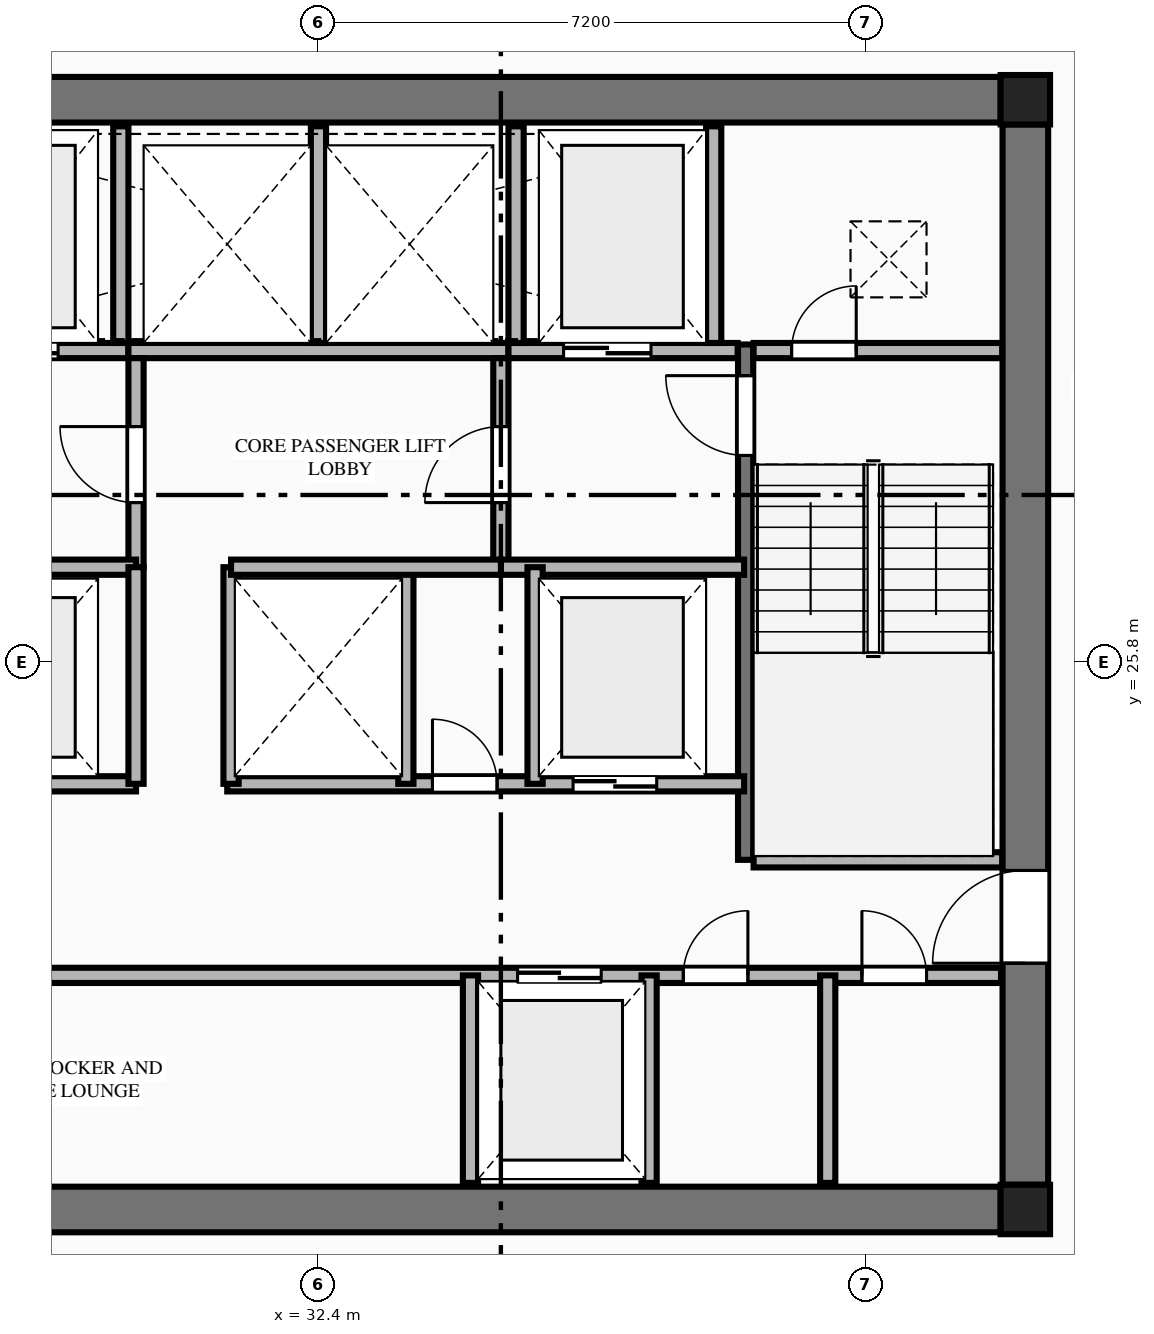
"""IFC4 building model, lengths in metres.
Left out: names, types, materials, properties, quantities, classifications, styles, units other than length and angle.
Written with IfcOpenShell. Run it as: python <this file> out.ifc"""

import sys

from ifc_helpers import new_model, si_unit, direction, frame, frame_2d, origin, origin_2d, place, context, subcontext, project, spatial, rectangle, extrude, element, fill, save


model = new_model("IFC4")
c1 = context("Model", 3, precision=1e-05, world=origin(), true_north=direction((0.0, 1.0)))
c2 = subcontext(c1, "Body", "Model", "MODEL_VIEW")
j1 = project(units=[si_unit("LENGTHUNIT", "METRE"), si_unit("PLANEANGLEUNIT", "RADIAN")], contexts=[c1])
p1 = place(None, origin())
s1 = spatial("IfcSite", under=j1, at=p1, CompositionType="ELEMENT")
p2 = place(p1, origin())
s2 = spatial("IfcBuilding", under=s1, at=p2, CompositionType="ELEMENT")
p3 = place(p2, frame((0.0, 0.0, 157.05)))
s3 = spatial("IfcBuildingStorey", under=s2, at=p3, CompositionType="ELEMENT", Elevation=157.05)
for number, where, z_axis, x_axis in (
    (1, (41.7, 18.6, 0.0), (0.0, 0.0, 1.0), (1.0, 0.0, 0.0)),
    (2, (41.7, 33.2, 0.0), (0.0, 0.0, 1.0), (1.0, 0.0, 0.0)),
):
    element("IfcColumn", number, at=place(p3, frame(where, z_axis=z_axis, x_axis=x_axis)), inside=s3, PredefinedType="COLUMN", context=c2, shape_type="SweptSolid", body=[
        extrude(rectangle(XDim=0.65, YDim=0.65, at=origin_2d()), origin(), (0.0, 0.0, 1.0), 3.55),
    ])
for number, where, z_axis, x_axis in (
    (3, (23.425, 18.6, 0.0), (0.0, 0.0, 1.0), (1.0, 0.0, 0.0)),
    (4, (23.425, 33.2, 0.0), (0.0, 0.0, 1.0), (1.0, 0.0, 0.0)),
):
    element("IfcWall", number, at=place(p3, frame(where, z_axis=z_axis, x_axis=x_axis)), inside=s3, PredefinedType="SHEAR", context=c2, shape_type="SweptSolid", body=[
        extrude(rectangle(XDim=17.95, YDim=0.6, at=frame_2d((8.975, 0.0))), origin(), (0.0, 0.0, 1.0), 3.34),
    ])
p4 = place(p3, frame((41.7, 18.925, 0.0), z_axis=(0.0, 0.0, 1.0), x_axis=(0.0, 1.0, 0.0)))
e5 = element("IfcWall", 5, at=p4, inside=s3, PredefinedType="SHEAR", context=c2, shape_type="SweptSolid", body=[
    extrude(rectangle(XDim=13.95, YDim=0.6, at=frame_2d((6.975, 0.0))), origin(), (0.0, 0.0, 1.0), 3.34),
])
p5 = place(p4, frame((2.915, 0.0, 0.0)))
e6 = element("IfcOpeningElement", 6, at=p5, cuts=e5, PredefinedType="OPENING", context=c2, shape_type="SweptSolid", body=[
    extrude(rectangle(XDim=1.22, YDim=2.25, at=frame_2d((0.61, 1.125))), frame((0.0, 0.31, 0.0), z_axis=(0.0, -1.0, 0.0), x_axis=(1.0, 0.0, 0.0)), (0.0, 0.0, 1.0), 0.62),
])
p6 = place(p3, frame((38.02, 23.2, 0.0), z_axis=(0.0, 0.0, 1.0), x_axis=(0.0, 1.0, 0.0)))
e7 = element("IfcWall", 7, at=p6, inside=s3, PredefinedType="SHEAR", context=c2, shape_type="SweptSolid", body=[
    extrude(rectangle(XDim=6.78, YDim=0.2, at=frame_2d((3.39, 0.0))), origin(), (0.0, 0.0, 1.0), 3.55),
])
p7 = place(p6, frame((5.32, 0.0, 0.0)))
e8 = element("IfcOpeningElement", 8, at=p7, cuts=e7, PredefinedType="OPENING", context=c2, shape_type="SweptSolid", body=[
    extrude(rectangle(XDim=1.05, YDim=2.15, at=frame_2d((0.525, 1.075))), frame((0.0, 0.11, 0.0), z_axis=(0.0, -1.0, 0.0), x_axis=(1.0, 0.0, 0.0)), (0.0, 0.0, 1.0), 0.22),
])
p8 = place(p3, frame((38.125, 23.2, 0.0), z_axis=(0.0, 0.0, 1.0), x_axis=(1.0, 0.0, 0.0)))
e9 = element("IfcWall", 9, at=p8, inside=s3, PredefinedType="PLUMBINGWALL", context=c2, shape_type="SweptSolid", body=[
    extrude(rectangle(XDim=3.27, YDim=0.2, at=frame_2d((1.635, 0.0))), origin(), (0.0, 0.0, 1.0), 3.34),
])
p9 = place(p3, frame((26.885, 29.9, 0.0), z_axis=(0.0, 0.0, 1.0), x_axis=(1.0, 0.0, 0.0)))
e10 = element("IfcWall", 10, at=p9, inside=s3, PredefinedType="PLUMBINGWALL", context=c2, shape_type="SweptSolid", body=[
    extrude(rectangle(XDim=3.015, YDim=0.2, at=frame_2d((1.507, 0.0))), origin(), (0.0, 0.0, 1.0), 3.34),
])
p10 = place(p9, frame((0.94, 0.0, 0.0)))
e11 = element("IfcOpeningElement", 11, at=p10, cuts=e10, PredefinedType="OPENING", context=c2, shape_type="SweptSolid", body=[
    extrude(rectangle(XDim=1.15, YDim=2.2, at=frame_2d((0.575, 1.1))), frame((0.0, 0.11, 0.0), z_axis=(0.0, -1.0, 0.0), x_axis=(1.0, 0.0, 0.0)), (0.0, 0.0, 1.0), 0.22),
])
p11 = place(p3, frame((29.9, 29.9, 0.0), z_axis=(0.0, 0.0, 1.0), x_axis=(1.0, 0.0, 0.0)))
e12 = element("IfcWall", 12, at=p11, inside=s3, PredefinedType="PLUMBINGWALL", context=c2, shape_type="SweptSolid", body=[
    extrude(rectangle(XDim=5.0, YDim=0.2, at=frame_2d((2.5, 0.0))), origin(), (0.0, 0.0, 1.0), 3.34),
])
p12 = place(p3, frame((34.9, 29.9, 0.0), z_axis=(0.0, 0.0, 1.0), x_axis=(1.0, 0.0, 0.0)))
e13 = element("IfcWall", 13, at=p12, inside=s3, PredefinedType="PLUMBINGWALL", context=c2, shape_type="SweptSolid", body=[
    extrude(rectangle(XDim=3.015, YDim=0.2, at=frame_2d((1.508, 0.0))), origin(), (0.0, 0.0, 1.0), 3.34),
])
p13 = place(p12, frame((0.725, 0.0, 0.0)))
e14 = element("IfcOpeningElement", 14, at=p13, cuts=e13, PredefinedType="OPENING", context=c2, shape_type="SweptSolid", body=[
    extrude(rectangle(XDim=1.15, YDim=2.2, at=frame_2d((0.575, 1.1))), frame((0.0, 0.11, 0.0), z_axis=(0.0, -1.0, 0.0), x_axis=(1.0, 0.0, 0.0)), (0.0, 0.0, 1.0), 0.22),
])
p14 = place(p3, frame((38.125, 29.9, 0.0), z_axis=(0.0, 0.0, 1.0), x_axis=(1.0, 0.0, 0.0)))
e15 = element("IfcWall", 15, at=p14, inside=s3, PredefinedType="PLUMBINGWALL", context=c2, shape_type="SweptSolid", body=[
    extrude(rectangle(XDim=3.27, YDim=0.2, at=frame_2d((1.635, 0.0))), origin(), (0.0, 0.0, 1.0), 3.34),
])
p15 = place(p14, frame((0.5, 0.0, 0.0)))
e16 = element("IfcOpeningElement", 16, at=p15, cuts=e15, PredefinedType="OPENING", context=c2, shape_type="SweptSolid", body=[
    extrude(rectangle(XDim=0.85, YDim=2.05, at=frame_2d((0.425, 1.025))), frame((0.0, 0.11, 0.0), z_axis=(0.0, -1.0, 0.0), x_axis=(1.0, 0.0, 0.0)), (0.0, 0.0, 1.0), 0.22),
])
for number, where, z_axis, x_axis in (
    (17, (29.8, 30.0, 0.0), (0.0, 0.0, 1.0), (0.0, 1.0, 0.0)),
    (18, (32.4, 30.0, 0.0), (0.0, 0.0, 1.0), (0.0, 1.0, 0.0)),
    (19, (35.0, 30.0, 0.0), (0.0, 0.0, 1.0), (0.0, 1.0, 0.0)),
    (20, (37.6, 30.0, 0.0), (0.0, 0.0, 1.0), (0.0, 1.0, 0.0)),
):
    element("IfcWall", number, at=place(p3, frame(where, z_axis=z_axis, x_axis=x_axis)), inside=s3, PredefinedType="PLUMBINGWALL", context=c2, shape_type="SweptSolid", body=[
        extrude(rectangle(XDim=2.85, YDim=0.2, at=frame_2d((1.425, 0.0))), origin(), (0.0, 0.0, 1.0), 3.34),
    ])
p16 = place(p3, frame((30.0, 27.05, 0.0), z_axis=(0.0, 0.0, 1.0), x_axis=(0.0, 1.0, 0.0)))
e21 = element("IfcWall", 21, at=p16, inside=s3, PredefinedType="PLUMBINGWALL", context=c2, shape_type="SweptSolid", body=[
    extrude(rectangle(XDim=2.75, YDim=0.2, at=frame_2d((1.375, 0.0))), origin(), (0.0, 0.0, 1.0), 3.34),
])
p17 = place(p16, frame((0.85, 0.0, 0.0)))
e22 = element("IfcOpeningElement", 22, at=p17, cuts=e21, PredefinedType="OPENING", context=c2, shape_type="SweptSolid", body=[
    extrude(rectangle(XDim=1.0, YDim=2.15, at=frame_2d((0.5, 1.075))), frame((0.0, 0.11, 0.0), z_axis=(0.0, -1.0, 0.0), x_axis=(1.0, 0.0, 0.0)), (0.0, 0.0, 1.0), 0.22),
])
p18 = place(p3, frame((26.8, 27.05, 0.0), z_axis=(0.0, 0.0, 1.0), x_axis=(1.0, 0.0, 0.0)))
e23 = element("IfcWall", 23, at=p18, inside=s3, PredefinedType="PLUMBINGWALL", context=c2, shape_type="SweptSolid", body=[
    extrude(rectangle(XDim=3.2, YDim=0.2, at=frame_2d((1.6, 0.0))), origin(), (0.0, 0.0, 1.0), 3.34),
])
p19 = place(p3, frame((34.8, 27.05, 0.0), z_axis=(0.0, 0.0, 1.0), x_axis=(0.0, 1.0, 0.0)))
e24 = element("IfcWall", 24, at=p19, inside=s3, PredefinedType="PLUMBINGWALL", context=c2, shape_type="SweptSolid", body=[
    extrude(rectangle(XDim=2.75, YDim=0.2, at=frame_2d((1.375, 0.0))), origin(), (0.0, 0.0, 1.0), 3.34),
])
p20 = place(p19, frame((0.85, 0.0, 0.0)))
e25 = element("IfcOpeningElement", 25, at=p20, cuts=e24, PredefinedType="OPENING", context=c2, shape_type="SweptSolid", body=[
    extrude(rectangle(XDim=1.0, YDim=2.15, at=frame_2d((0.5, 1.075))), frame((0.0, 0.11, 0.0), z_axis=(0.0, -1.0, 0.0), x_axis=(1.0, 0.0, 0.0)), (0.0, 0.0, 1.0), 0.22),
])
p21 = place(p3, frame((34.8, 27.05, 0.0), z_axis=(0.0, 0.0, 1.0), x_axis=(1.0, 0.0, 0.0)))
e26 = element("IfcWall", 26, at=p21, inside=s3, PredefinedType="PLUMBINGWALL", context=c2, shape_type="SweptSolid", body=[
    extrude(rectangle(XDim=3.2, YDim=0.2, at=frame_2d((1.6, 0.0))), origin(), (0.0, 0.0, 1.0), 3.34),
])
p22 = place(p3, frame((26.8, 24.2, 0.0), z_axis=(0.0, 0.0, 1.0), x_axis=(1.0, 0.0, 0.0)))
e27 = element("IfcWall", 27, at=p22, inside=s3, PredefinedType="PLUMBINGWALL", context=c2, shape_type="SweptSolid", body=[
    extrude(rectangle(XDim=3.2, YDim=0.2, at=frame_2d((1.6, 0.0))), origin(), (0.0, 0.0, 1.0), 3.34),
])
p23 = place(p22, frame((0.85, 0.0, 0.0)))
e28 = element("IfcOpeningElement", 28, at=p23, cuts=e27, PredefinedType="OPENING", context=c2, shape_type="SweptSolid", body=[
    extrude(rectangle(XDim=1.1, YDim=2.2, at=frame_2d((0.55, 1.1))), frame((0.0, 0.11, 0.0), z_axis=(0.0, -1.0, 0.0), x_axis=(1.0, 0.0, 0.0)), (0.0, 0.0, 1.0), 0.22),
])
p24 = place(p3, frame((30.0, 24.2, 0.0), z_axis=(0.0, 0.0, 1.0), x_axis=(0.0, 1.0, 0.0)))
e29 = element("IfcWall", 29, at=p24, inside=s3, PredefinedType="PLUMBINGWALL", context=c2, shape_type="SweptSolid", body=[
    extrude(rectangle(XDim=2.85, YDim=0.2, at=frame_2d((1.425, 0.0))), origin(), (0.0, 0.0, 1.0), 3.34),
])
p25 = place(p3, frame((31.2, 24.2, 0.0), z_axis=(0.0, 0.0, 1.0), x_axis=(1.0, 0.0, 0.0)))
e30 = element("IfcWall", 30, at=p25, inside=s3, PredefinedType="PLUMBINGWALL", context=c2, shape_type="SweptSolid", body=[
    extrude(rectangle(XDim=6.8, YDim=0.2, at=frame_2d((3.4, 0.0))), origin(), (0.0, 0.0, 1.0), 3.34),
])
p26 = place(p25, frame((2.7, 0.0, 0.0)))
e31 = element("IfcOpeningElement", 31, at=p26, cuts=e30, PredefinedType="OPENING", context=c2, shape_type="SweptSolid", body=[
    extrude(rectangle(XDim=0.85, YDim=2.05, at=frame_2d((0.425, 1.025))), frame((0.0, 0.11, 0.0), z_axis=(0.0, -1.0, 0.0), x_axis=(1.0, 0.0, 0.0)), (0.0, 0.0, 1.0), 0.22),
])
p27 = place(p25, frame((4.55, 0.0, 0.0)))
e32 = element("IfcOpeningElement", 32, at=p27, cuts=e30, PredefinedType="OPENING", context=c2, shape_type="SweptSolid", body=[
    extrude(rectangle(XDim=1.1, YDim=2.2, at=frame_2d((0.55, 1.1))), frame((0.0, 0.11, 0.0), z_axis=(0.0, -1.0, 0.0), x_axis=(1.0, 0.0, 0.0)), (0.0, 0.0, 1.0), 0.22),
])
for number, where, z_axis, x_axis in (
    (33, (31.25, 24.2, 0.0), (0.0, 0.0, 1.0), (0.0, 1.0, 0.0)),
    (34, (33.55, 24.2, 0.0), (0.0, 0.0, 1.0), (0.0, 1.0, 0.0)),
    (35, (35.25, 24.2, 0.0), (0.0, 0.0, 1.0), (0.0, 1.0, 0.0)),
):
    element("IfcWall", number, at=place(p3, frame(where, z_axis=z_axis, x_axis=x_axis)), inside=s3, PredefinedType="PLUMBINGWALL", context=c2, shape_type="SweptSolid", body=[
        extrude(rectangle(XDim=2.85, YDim=0.2, at=frame_2d((1.425, 0.0))), origin(), (0.0, 0.0, 1.0), 3.34),
    ])
p28 = place(p3, frame((31.25, 27.05, 0.0), z_axis=(0.0, 0.0, 1.0), x_axis=(1.0, 0.0, 0.0)))
e36 = element("IfcWall", 36, at=p28, inside=s3, PredefinedType="PLUMBINGWALL", context=c2, shape_type="SweptSolid", body=[
    extrude(rectangle(XDim=3.55, YDim=0.2, at=frame_2d((1.775, 0.0))), origin(), (0.0, 0.0, 1.0), 3.34),
])
p29 = place(p3, frame((23.42, 21.68, 0.0), z_axis=(0.0, 0.0, 1.0), x_axis=(1.0, 0.0, 0.0)))
e37 = element("IfcWall", 37, at=p29, inside=s3, PredefinedType="PLUMBINGWALL", context=c2, shape_type="SweptSolid", body=[
    extrude(rectangle(XDim=17.96, YDim=0.2, at=frame_2d((8.98, 0.0))), origin(), (0.0, 0.0, 1.0), 3.34),
])
p30 = place(p29, frame((11.6, 0.0, 0.0)))
e38 = element("IfcOpeningElement", 38, at=p30, cuts=e37, PredefinedType="OPENING", context=c2, shape_type="SweptSolid", body=[
    extrude(rectangle(XDim=1.1, YDim=2.2, at=frame_2d((0.55, 1.1))), frame((0.0, 0.11, 0.0), z_axis=(0.0, -1.0, 0.0), x_axis=(1.0, 0.0, 0.0)), (0.0, 0.0, 1.0), 0.22),
])
p31 = place(p29, frame((0.41, 0.0, 0.0)))
e39 = element("IfcOpeningElement", 39, at=p31, cuts=e37, PredefinedType="OPENING", context=c2, shape_type="SweptSolid", body=[
    extrude(rectangle(XDim=0.85, YDim=2.05, at=frame_2d((0.425, 1.025))), frame((0.0, 0.11, 0.0), z_axis=(0.0, -1.0, 0.0), x_axis=(1.0, 0.0, 0.0)), (0.0, 0.0, 1.0), 0.22),
])
p32 = place(p29, frame((13.78, 0.0, 0.0)))
e40 = element("IfcOpeningElement", 40, at=p32, cuts=e37, PredefinedType="OPENING", context=c2, shape_type="SweptSolid", body=[
    extrude(rectangle(XDim=0.85, YDim=2.05, at=frame_2d((0.425, 1.025))), frame((0.0, 0.11, 0.0), z_axis=(0.0, -1.0, 0.0), x_axis=(1.0, 0.0, 0.0)), (0.0, 0.0, 1.0), 0.22),
])
p33 = place(p29, frame((16.13, 0.0, 0.0)))
e41 = element("IfcOpeningElement", 41, at=p33, cuts=e37, PredefinedType="OPENING", context=c2, shape_type="SweptSolid", body=[
    extrude(rectangle(XDim=0.85, YDim=2.05, at=frame_2d((0.425, 1.025))), frame((0.0, 0.11, 0.0), z_axis=(0.0, -1.0, 0.0), x_axis=(1.0, 0.0, 0.0)), (0.0, 0.0, 1.0), 0.22),
])
for number, where, z_axis, x_axis in (
    (42, (34.4, 18.95, 0.0), (0.0, 0.0, 1.0), (0.0, 1.0, 0.0)),
    (43, (36.75, 18.95, 0.0), (0.0, 0.0, 1.0), (0.0, 1.0, 0.0)),
    (44, (39.1, 18.95, 0.0), (0.0, 0.0, 1.0), (0.0, 1.0, 0.0)),
):
    element("IfcWall", number, at=place(p3, frame(where, z_axis=z_axis, x_axis=x_axis)), inside=s3, PredefinedType="PLUMBINGWALL", context=c2, shape_type="SweptSolid", body=[
        extrude(rectangle(XDim=2.73, YDim=0.2, at=frame_2d((1.365, 0.0))), origin(), (0.0, 0.0, 1.0), 3.34),
    ])
p34 = place(p5, origin())
e45 = element("IfcDoor", 45, at=p34, inside=s3, OperationType="SINGLE_SWING_LEFT", PredefinedType="DOOR", context=c2, shape_type="SweptSolid", body=[
    extrude(rectangle(XDim=1.22, YDim=2.25, at=frame_2d((0.61, 1.125))), frame((0.0, 0.025, 0.0), z_axis=(0.0, -1.0, 0.0), x_axis=(1.0, 0.0, 0.0)), (0.0, 0.0, 1.0), 0.05),
])
fill(e6, e45)
p35 = place(p7, origin())
e46 = element("IfcDoor", 46, at=p35, inside=s3, OperationType="SINGLE_SWING_RIGHT", PredefinedType="DOOR", context=c2, shape_type="SweptSolid", body=[
    extrude(rectangle(XDim=1.05, YDim=2.15, at=frame_2d((0.525, 1.075))), frame((0.0, 0.025, 0.0), z_axis=(0.0, -1.0, 0.0), x_axis=(1.0, 0.0, 0.0)), (0.0, 0.0, 1.0), 0.05),
])
fill(e8, e46)
p36 = place(p15, origin())
e47 = element("IfcDoor", 47, at=p36, inside=s3, OperationType="SINGLE_SWING_RIGHT", PredefinedType="DOOR", context=c2, shape_type="SweptSolid", body=[
    extrude(rectangle(XDim=0.85, YDim=2.05, at=frame_2d((0.425, 1.025))), frame((0.0, 0.025, 0.0), z_axis=(0.0, -1.0, 0.0), x_axis=(1.0, 0.0, 0.0)), (0.0, 0.0, 1.0), 0.05),
])
fill(e16, e47)
p37 = place(p10, origin())
e48 = element("IfcDoor", 48, at=p37, inside=s3, OperationType="DOUBLE_DOOR_SLIDING", PredefinedType="DOOR", context=c2, shape_type="SweptSolid", body=[
    extrude(rectangle(XDim=1.15, YDim=2.2, at=frame_2d((0.575, 1.1))), frame((0.0, 0.025, 0.0), z_axis=(0.0, -1.0, 0.0), x_axis=(1.0, 0.0, 0.0)), (0.0, 0.0, 1.0), 0.05),
])
fill(e11, e48)
p38 = place(p13, origin())
e49 = element("IfcDoor", 49, at=p38, inside=s3, OperationType="DOUBLE_DOOR_SLIDING", PredefinedType="DOOR", context=c2, shape_type="SweptSolid", body=[
    extrude(rectangle(XDim=1.15, YDim=2.2, at=frame_2d((0.575, 1.1))), frame((0.0, 0.025, 0.0), z_axis=(0.0, -1.0, 0.0), x_axis=(1.0, 0.0, 0.0)), (0.0, 0.0, 1.0), 0.05),
])
fill(e14, e49)
p39 = place(p17, origin())
e50 = element("IfcDoor", 50, at=p39, inside=s3, OperationType="SINGLE_SWING_RIGHT", PredefinedType="DOOR", context=c2, shape_type="SweptSolid", body=[
    extrude(rectangle(XDim=1.0, YDim=2.15, at=frame_2d((0.5, 1.075))), frame((0.0, 0.025, 0.0), z_axis=(0.0, -1.0, 0.0), x_axis=(1.0, 0.0, 0.0)), (0.0, 0.0, 1.0), 0.05),
])
fill(e22, e50)
p40 = place(p20, origin())
e51 = element("IfcDoor", 51, at=p40, inside=s3, OperationType="SINGLE_SWING_LEFT", PredefinedType="DOOR", context=c2, shape_type="SweptSolid", body=[
    extrude(rectangle(XDim=1.0, YDim=2.15, at=frame_2d((0.5, 1.075))), frame((0.0, 0.025, 0.0), z_axis=(0.0, -1.0, 0.0), x_axis=(1.0, 0.0, 0.0)), (0.0, 0.0, 1.0), 0.05),
])
fill(e25, e51)
p41 = place(p26, origin())
e52 = element("IfcDoor", 52, at=p41, inside=s3, OperationType="SINGLE_SWING_LEFT", PredefinedType="DOOR", context=c2, shape_type="SweptSolid", body=[
    extrude(rectangle(XDim=0.85, YDim=2.05, at=frame_2d((0.425, 1.025))), frame((0.0, 0.025, 0.0), z_axis=(0.0, -1.0, 0.0), x_axis=(1.0, 0.0, 0.0)), (0.0, 0.0, 1.0), 0.05),
])
fill(e31, e52)
p42 = place(p27, origin())
e53 = element("IfcDoor", 53, at=p42, inside=s3, OperationType="DOUBLE_DOOR_SLIDING", PredefinedType="DOOR", context=c2, shape_type="SweptSolid", body=[
    extrude(rectangle(XDim=1.1, YDim=2.2, at=frame_2d((0.55, 1.1))), frame((0.0, 0.025, 0.0), z_axis=(0.0, -1.0, 0.0), x_axis=(1.0, 0.0, 0.0)), (0.0, 0.0, 1.0), 0.05),
])
fill(e32, e53)
p43 = place(p30, origin())
e54 = element("IfcDoor", 54, at=p43, inside=s3, OperationType="DOUBLE_DOOR_SLIDING", PredefinedType="DOOR", context=c2, shape_type="SweptSolid", body=[
    extrude(rectangle(XDim=1.1, YDim=2.2, at=frame_2d((0.55, 1.1))), frame((0.0, 0.025, 0.0), z_axis=(0.0, -1.0, 0.0), x_axis=(1.0, 0.0, 0.0)), (0.0, 0.0, 1.0), 0.05),
])
fill(e38, e54)
p44 = place(p32, origin())
e55 = element("IfcDoor", 55, at=p44, inside=s3, OperationType="SINGLE_SWING_RIGHT", PredefinedType="DOOR", context=c2, shape_type="SweptSolid", body=[
    extrude(rectangle(XDim=0.85, YDim=2.05, at=frame_2d((0.425, 1.025))), frame((0.0, 0.025, 0.0), z_axis=(0.0, -1.0, 0.0), x_axis=(1.0, 0.0, 0.0)), (0.0, 0.0, 1.0), 0.05),
])
fill(e40, e55)
p45 = place(p33, origin())
e56 = element("IfcDoor", 56, at=p45, inside=s3, OperationType="SINGLE_SWING_LEFT", PredefinedType="DOOR", context=c2, shape_type="SweptSolid", body=[
    extrude(rectangle(XDim=0.85, YDim=2.05, at=frame_2d((0.425, 1.025))), frame((0.0, 0.025, 0.0), z_axis=(0.0, -1.0, 0.0), x_axis=(1.0, 0.0, 0.0)), (0.0, 0.0, 1.0), 0.05),
])
fill(e41, e56)
save(model, sys.argv[1])
